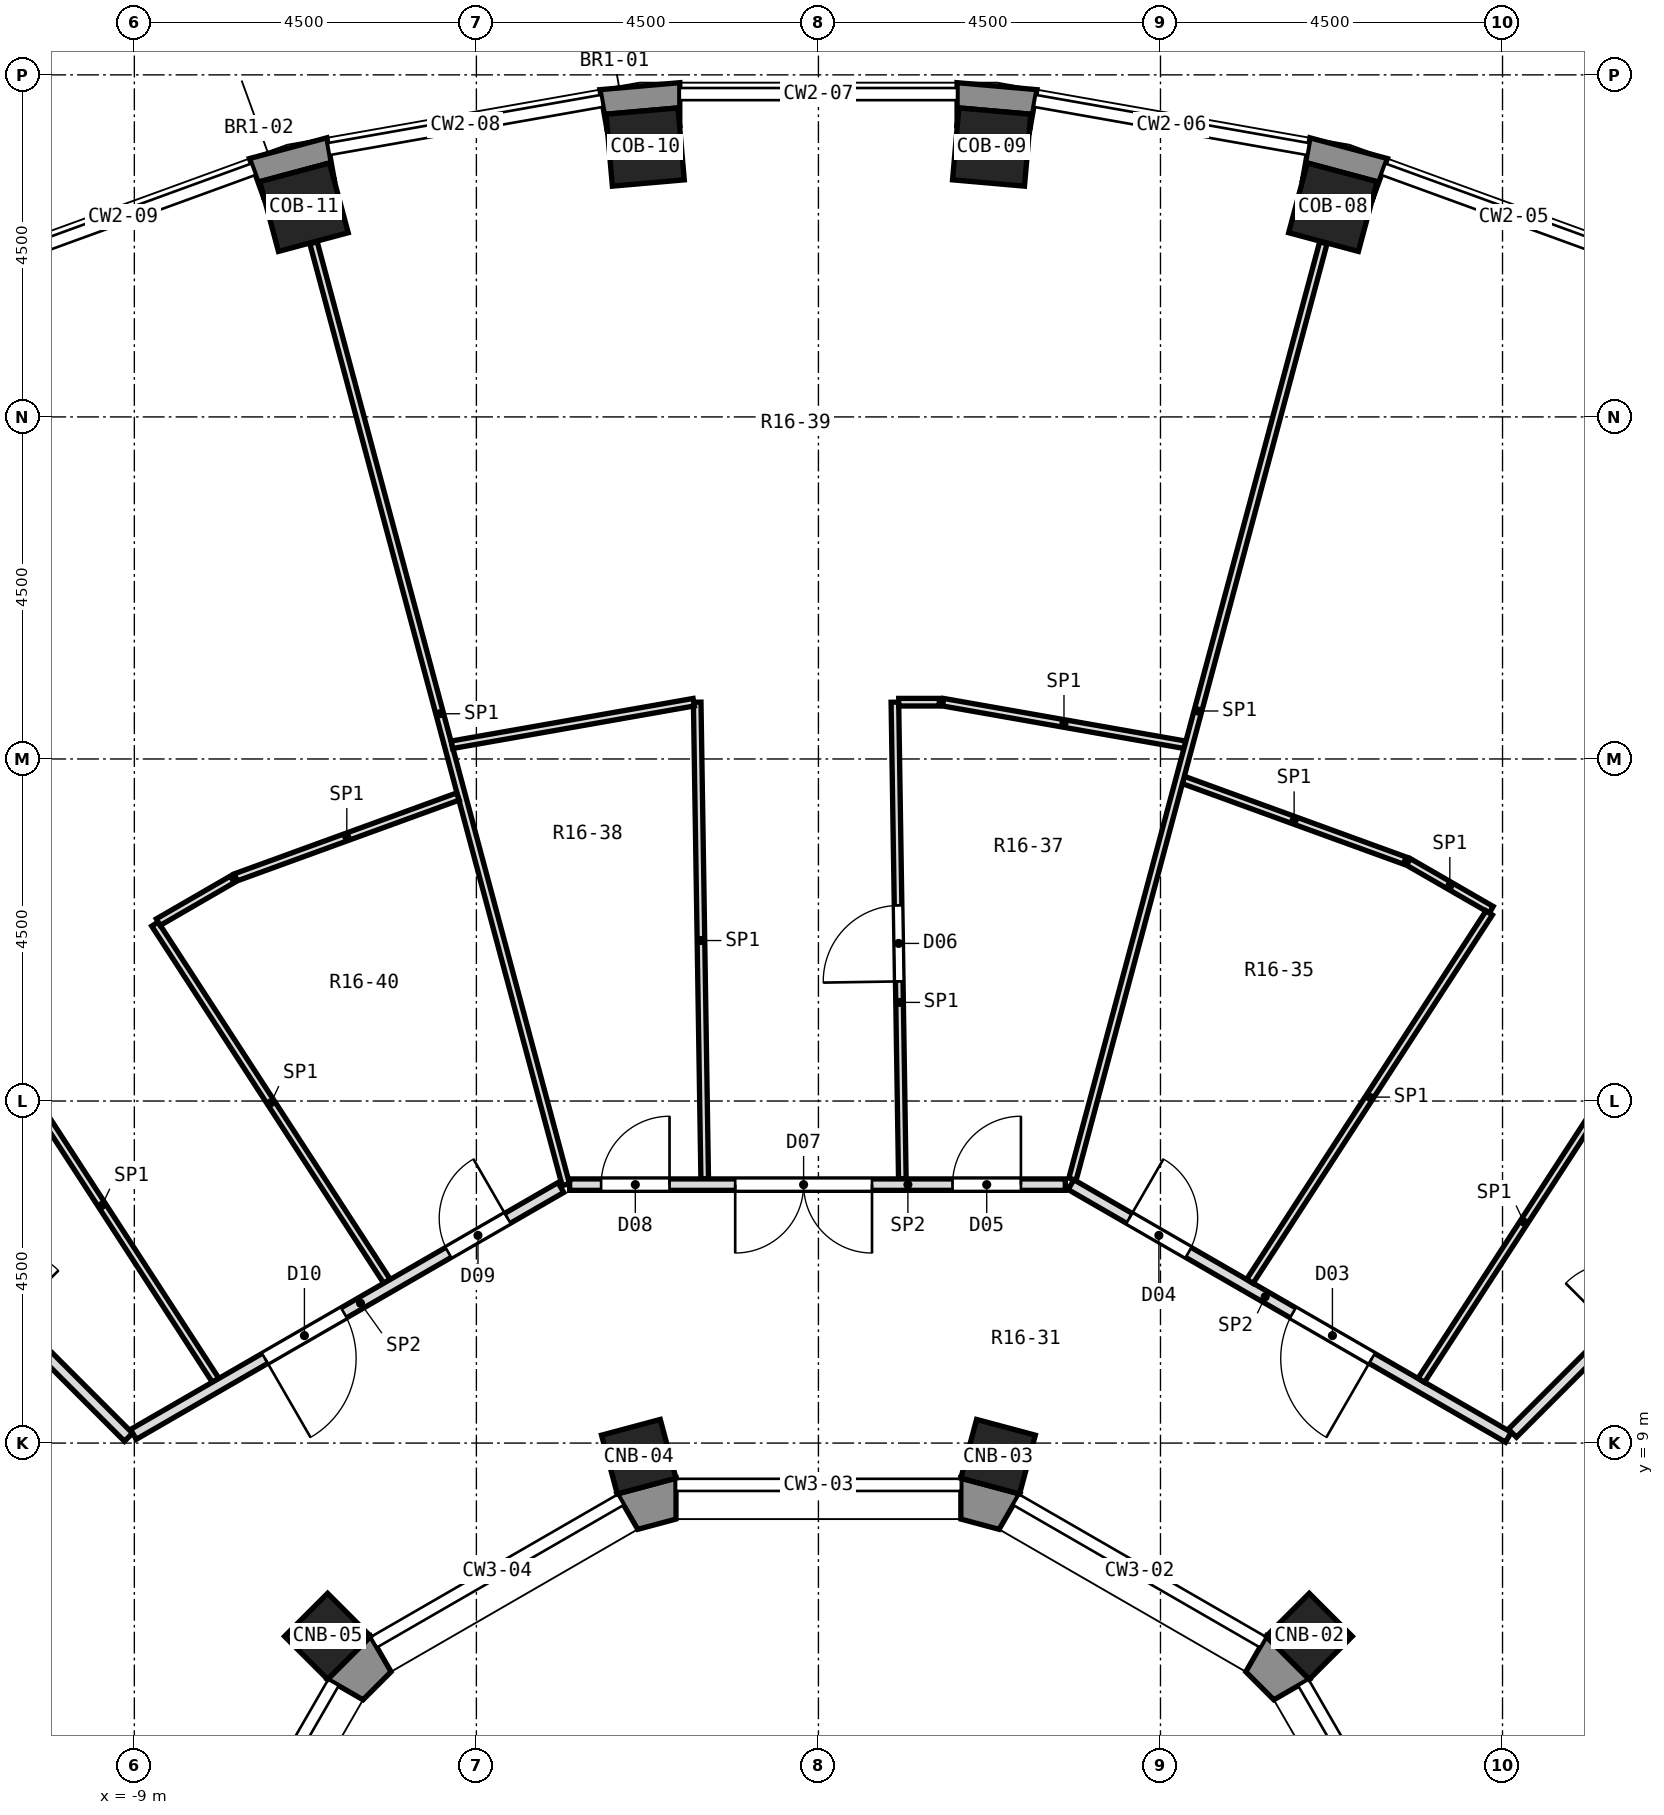
"""IFC4 building model, lengths in metres.
Left out: names, types, materials, properties, quantities, classifications, styles, units other than length and angle.
Written with IfcOpenShell. Run it as: python <this file> out.ifc"""

import sys

from ifc_helpers import new_model, si_unit, direction, frame, frame_2d, origin, origin_2d, place, context, subcontext, project, spatial, polyline, rectangle, outline, extrude, element, fill, save


model = new_model("IFC4")
c1 = context("Model", 3, precision=1e-05, world=origin(), true_north=direction((0.0, 1.0)))
c2 = subcontext(c1, "Body", "Model", "MODEL_VIEW")
j1 = project(units=[si_unit("LENGTHUNIT", "METRE"), si_unit("PLANEANGLEUNIT", "RADIAN")], contexts=[c1])
p1 = place(None, origin())
s1 = spatial("IfcSite", under=j1, at=p1, CompositionType="ELEMENT")
p2 = place(p1, origin())
s2 = spatial("IfcBuilding", under=s1, at=p2, CompositionType="ELEMENT")
p3 = place(p2, frame((0.0, 0.0, 86.9)))
s3 = spatial("IfcBuildingStorey", under=s2, at=p3, CompositionType="ELEMENT", Elevation=86.9)
for number, where, z_axis, x_axis in (
    (1, (6.768, 25.259, -0.55), (0.0, 0.0, 1.0), (0.259, 0.966, 0.0)),
    (2, (2.279, 26.051, -0.55), (0.0, 0.0, 1.0), (0.087, 0.996, 0.0)),
    (3, (-2.279, 26.051, -0.55), (0.0, 0.0, 1.0), (-0.087, 0.996, 0.0)),
    (4, (-6.768, 25.259, -0.55), (0.0, 0.0, 1.0), (-0.259, 0.966, 0.0)),
):
    element("IfcColumn", number, at=place(p3, frame(where, z_axis=z_axis, x_axis=x_axis)), inside=s3, PredefinedType="COLUMN", context=c2, shape_type="SweptSolid", body=[
        extrude(rectangle(XDim=0.95, YDim=0.95, at=origin_2d()), origin(), (0.0, 0.0, 1.0), 5.55),
    ])
for number, where, z_axis, x_axis in (
    (5, (6.458, 6.458, 0.0), (0.0, 0.0, 1.0), (0.707, 0.707, 0.0)),
    (6, (2.364, 8.821, 0.0), (0.0, 0.0, 1.0), (0.259, 0.966, 0.0)),
    (7, (-2.364, 8.821, 0.0), (0.0, 0.0, 1.0), (-0.259, 0.966, 0.0)),
    (8, (-6.458, 6.458, 0.0), (0.0, 0.0, 1.0), (-0.707, 0.707, 0.0)),
):
    element("IfcColumn", number, at=place(p3, frame(where, z_axis=z_axis, x_axis=x_axis)), inside=s3, PredefinedType="COLUMN", context=c2, shape_type="SweptSolid", body=[
        extrude(rectangle(XDim=0.8, YDim=0.8, at=origin_2d()), origin(), (0.0, 0.0, 1.0), 5.0),
    ])
p4 = place(p3, origin())
e9 = element("IfcWall", 9, at=p4, inside=s3, PredefinedType="SOLIDWALL", context=c2, shape_type="SweptSolid", body=[
    extrude(outline(polyline([(7.486, 25.899), (6.467, 26.172), (6.363, 25.581), (6.432, 25.841), (7.35, 25.595), (7.28, 25.335), (7.486, 25.899)])), origin(), (0.0, 0.0, 1.0), 4.5),
])
p5 = place(p3, origin())
e10 = element("IfcWall", 10, at=p5, inside=s3, PredefinedType="SOLIDWALL", context=c2, shape_type="SweptSolid", body=[
    extrude(outline(polyline([(2.875, 26.805), (1.824, 26.897), (1.824, 26.297), (1.847, 26.565), (2.794, 26.482), (2.77, 26.215), (2.875, 26.805)])), origin(), (0.0, 0.0, 1.0), 4.5),
])
p6 = place(p3, origin())
e11 = element("IfcWall", 11, at=p6, inside=s3, PredefinedType="SOLIDWALL", context=c2, shape_type="SweptSolid", body=[
    extrude(outline(polyline([(-2.875, 26.805), (-2.77, 26.215), (-2.794, 26.482), (-1.847, 26.565), (-1.824, 26.297), (-1.824, 26.897), (-2.875, 26.805)])), origin(), (0.0, 0.0, 1.0), 4.5),
])
p7 = place(p3, origin())
e12 = element("IfcWall", 12, at=p7, inside=s3, PredefinedType="SOLIDWALL", context=c2, shape_type="SweptSolid", body=[
    extrude(outline(polyline([(-6.467, 26.172), (-7.486, 25.899), (-7.28, 25.335), (-7.35, 25.595), (-6.432, 25.841), (-6.363, 25.581), (-6.467, 26.172)])), origin(), (0.0, 0.0, 1.0), 4.5),
])
p8 = place(p3, origin())
e13 = element("IfcWall", 13, at=p8, inside=s3, PredefinedType="SOLIDWALL", context=c2, shape_type="SweptSolid", body=[
    extrude(outline(polyline([(5.892, 6.458), (5.623, 5.991), (5.991, 5.623), (6.458, 5.892), (5.892, 6.458)])), origin(), (0.0, 0.0, 1.0), 4.5),
])
p9 = place(p3, origin())
e14 = element("IfcWall", 14, at=p9, inside=s3, PredefinedType="SOLIDWALL", context=c2, shape_type="SweptSolid", body=[
    extrude(outline(polyline([(1.874, 8.538), (1.874, 8.0), (2.377, 7.865), (2.646, 8.331), (1.874, 8.538)])), origin(), (0.0, 0.0, 1.0), 4.5),
])
p10 = place(p3, origin())
e15 = element("IfcWall", 15, at=p10, inside=s3, PredefinedType="SOLIDWALL", context=c2, shape_type="SweptSolid", body=[
    extrude(outline(polyline([(-2.646, 8.331), (-2.377, 7.865), (-1.874, 8.0), (-1.874, 8.538), (-2.646, 8.331)])), origin(), (0.0, 0.0, 1.0), 4.5),
])
p11 = place(p3, origin())
e16 = element("IfcWall", 16, at=p11, inside=s3, PredefinedType="SOLIDWALL", context=c2, shape_type="SweptSolid", body=[
    extrude(outline(polyline([(-6.458, 5.892), (-5.991, 5.623), (-5.623, 5.991), (-5.892, 6.458), (-6.458, 5.892)])), origin(), (0.0, 0.0, 1.0), 4.5),
])
p12 = place(p3, frame((-1.595, 18.747, 0.0), z_axis=(0.0, 0.0, 1.0), x_axis=(0.015762930389, -0.999875757295, 0.0)))
e17 = element("IfcWall", 17, at=p12, inside=s3, PredefinedType="PARTITIONING", context=c2, shape_type="SweptSolid", body=[
    extrude(rectangle(XDim=6.273, YDim=0.1, at=frame_2d((3.136, 0.0))), origin(), (0.0, 0.0, 1.0), 4.5),
])
p13 = place(p3, frame((1.006, 18.747, 0.0), z_axis=(0.0, 0.0, 1.0), x_axis=(0.015568373772, -0.999878805525, 0.0)))
e18 = element("IfcWall", 18, at=p13, inside=s3, PredefinedType="PARTITIONING", context=c2, shape_type="SweptSolid", body=[
    extrude(rectangle(XDim=6.273, YDim=0.1, at=frame_2d((3.136, 0.0))), origin(), (0.0, 0.0, 1.0), 4.5),
])
p14 = place(p13, frame((2.674, 0.0, 0.0)))
e19 = element("IfcOpeningElement", 19, at=p14, cuts=e18, PredefinedType="OPENING", context=c2, shape_type="SweptSolid", body=[
    extrude(rectangle(XDim=1.0, YDim=2.1, at=frame_2d((0.5, 1.05))), frame((0.0, 0.062, 0.0), z_axis=(0.0, -1.0, 0.0), x_axis=(1.0, 0.0, 0.0)), (0.0, 0.0, 1.0), 0.124),
])
p15 = place(p3, frame((-6.643, 24.791, 0.0), z_axis=(0.0, 0.0, 1.0), x_axis=(0.258784286108, -0.965935139263, 0.0)))
e20 = element("IfcWall", 20, at=p15, inside=s3, PredefinedType="PARTITIONING", context=c2, shape_type="SweptSolid", body=[
    extrude(rectangle(XDim=12.828, YDim=0.1, at=frame_2d((6.414, 0.0))), origin(), (0.0, 0.0, 1.0), 4.5),
])
p16 = place(p3, frame((-10.92, 14.429, 0.0), z_axis=(0.0, 0.0, 1.0), x_axis=(0.54460991282, -0.838689479401, 0.0)))
e21 = element("IfcWall", 21, at=p16, inside=s3, PredefinedType="PARTITIONING", context=c2, shape_type="SweptSolid", body=[
    extrude(rectangle(XDim=5.488, YDim=0.1, at=frame_2d((2.744, 0.0))), origin(), (0.0, 0.0, 1.0), 4.5),
])
p17 = place(p3, frame((-8.729, 15.828, 0.0), z_axis=(0.0, 0.0, 1.0), x_axis=(0.544769380459, -0.838585906222, 0.0)))
e22 = element("IfcWall", 22, at=p17, inside=s3, PredefinedType="PARTITIONING", context=c2, shape_type="SweptSolid", body=[
    extrude(rectangle(XDim=5.605, YDim=0.1, at=frame_2d((2.802, 0.0))), origin(), (0.0, 0.0, 1.0), 4.5),
])
p18 = place(p3, frame((-13.065, 13.065, 0.0), z_axis=(0.0, 0.0, 1.0), x_axis=(0.707106781187, -0.707106781187, 0.0)))
e23 = element("IfcWall", 23, at=p18, inside=s3, PredefinedType="PARTITIONING", context=c2, shape_type="SweptSolid", body=[
    extrude(rectangle(XDim=5.64, YDim=0.15, at=frame_2d((2.82, 0.0))), origin(), (0.0, 0.0, 1.0), 4.5),
])
p19 = place(p18, frame((2.537, 0.0, 0.0)))
e24 = element("IfcOpeningElement", 24, at=p19, cuts=e23, PredefinedType="OPENING", context=c2, shape_type="SweptSolid", body=[
    extrude(rectangle(XDim=0.9, YDim=2.1, at=frame_2d((0.45, 1.05))), frame((0.0, 0.087, 0.0), z_axis=(0.0, -1.0, 0.0), x_axis=(1.0, 0.0, 0.0)), (0.0, 0.0, 1.0), 0.174),
])
p20 = place(p3, frame((3.323, 12.4, 0.0), z_axis=(0.0, 0.0, 1.0), x_axis=(0.865961614908, -0.500110469302, 0.0)))
e25 = element("IfcWall", 25, at=p20, inside=s3, PredefinedType="PARTITIONING", context=c2, shape_type="SweptSolid", body=[
    extrude(rectangle(XDim=6.645, YDim=0.15, at=frame_2d((3.322, 0.0))), origin(), (0.0, 0.0, 1.0), 4.5),
])
p21 = place(p20, frame((3.372, 0.0, 0.0)))
e26 = element("IfcOpeningElement", 26, at=p21, cuts=e25, PredefinedType="OPENING", context=c2, shape_type="SweptSolid", body=[
    extrude(rectangle(XDim=1.2, YDim=2.1, at=frame_2d((0.6, 1.05))), frame((0.0, 0.087, 0.0), z_axis=(0.0, -1.0, 0.0), x_axis=(1.0, 0.0, 0.0)), (0.0, 0.0, 1.0), 0.174),
])
p22 = place(p20, frame((0.885, 0.0, 0.0)))
e27 = element("IfcOpeningElement", 27, at=p22, cuts=e25, PredefinedType="OPENING", context=c2, shape_type="SweptSolid", body=[
    extrude(rectangle(XDim=0.9, YDim=2.1, at=frame_2d((0.45, 1.05))), frame((0.0, 0.087, 0.0), z_axis=(0.0, -1.0, 0.0), x_axis=(1.0, 0.0, 0.0)), (0.0, 0.0, 1.0), 0.174),
])
p23 = place(p3, frame((7.762, 16.646, 0.0), z_axis=(0.0, 0.0, 1.0), x_axis=(0.866182356389, -0.499728051525, 0.0)))
e28 = element("IfcWall", 28, at=p23, inside=s3, PredefinedType="PARTITIONING", context=c2, shape_type="SweptSolid", body=[
    extrude(rectangle(XDim=1.259, YDim=0.1, at=frame_2d((0.629, 0.0))), origin(), (0.0, 0.0, 1.0), 4.5),
])
p24 = place(p3, frame((4.801, 17.724, 0.0), z_axis=(0.0, 0.0, 1.0), x_axis=(0.939676140835, -0.342065418225, 0.0)))
e29 = element("IfcWall", 29, at=p24, inside=s3, PredefinedType="PARTITIONING", context=c2, shape_type="SweptSolid", body=[
    extrude(rectangle(XDim=3.101, YDim=0.1, at=frame_2d((1.551, 0.0))), origin(), (0.0, 0.0, 1.0), 4.5),
])
p25 = place(p3, frame((1.64, 18.747, 0.0), z_axis=(0.0, 0.0, 1.0), x_axis=(0.984847393416, -0.173423215521, 0.0)))
e30 = element("IfcWall", 30, at=p25, inside=s3, PredefinedType="PARTITIONING", context=c2, shape_type="SweptSolid", body=[
    extrude(rectangle(XDim=3.231, YDim=0.1, at=frame_2d((1.615, 0.0))), origin(), (0.0, 0.0, 1.0), 4.5),
])
p26 = place(p3, frame((-3.273, 12.4, 0.0), z_axis=(0.0, 0.0, 1.0), x_axis=(1.0, 0.0, 0.0)))
e31 = element("IfcWall", 31, at=p26, inside=s3, PredefinedType="PARTITIONING", context=c2, shape_type="SweptSolid", body=[
    extrude(rectangle(XDim=6.521, YDim=0.15, at=frame_2d((3.26, 0.0))), origin(), (0.0, 0.0, 1.0), 4.5),
])
p27 = place(p26, frame((5.037, 0.0, 0.0)))
e32 = element("IfcOpeningElement", 32, at=p27, cuts=e31, PredefinedType="OPENING", context=c2, shape_type="SweptSolid", body=[
    extrude(rectangle(XDim=0.9, YDim=2.1, at=frame_2d((0.45, 1.05))), frame((0.0, 0.087, 0.0), z_axis=(0.0, -1.0, 0.0), x_axis=(1.0, 0.0, 0.0)), (0.0, 0.0, 1.0), 0.174),
])
p28 = place(p26, frame((2.178, 0.0, 0.0)))
e33 = element("IfcOpeningElement", 33, at=p28, cuts=e31, PredefinedType="OPENING", context=c2, shape_type="SweptSolid", body=[
    extrude(rectangle(XDim=1.8, YDim=2.1, at=frame_2d((0.9, 1.05))), frame((0.0, 0.087, 0.0), z_axis=(0.0, -1.0, 0.0), x_axis=(1.0, 0.0, 0.0)), (0.0, 0.0, 1.0), 0.174),
])
p29 = place(p26, frame((0.414, 0.0, 0.0)))
e34 = element("IfcOpeningElement", 34, at=p29, cuts=e31, PredefinedType="OPENING", context=c2, shape_type="SweptSolid", body=[
    extrude(rectangle(XDim=0.9, YDim=2.1, at=frame_2d((0.45, 1.05))), frame((0.0, 0.087, 0.0), z_axis=(0.0, -1.0, 0.0), x_axis=(1.0, 0.0, 0.0)), (0.0, 0.0, 1.0), 0.174),
])
p30 = place(p3, frame((1.056, 18.747, 0.0), z_axis=(0.0, 0.0, 1.0), x_axis=(1.0, 0.0, 0.0)))
e35 = element("IfcWall", 35, at=p30, inside=s3, PredefinedType="PARTITIONING", context=c2, shape_type="SweptSolid", body=[
    extrude(rectangle(XDim=0.534, YDim=0.1, at=frame_2d((0.267, 0.0))), origin(), (0.0, 0.0, 1.0), 4.5),
])
p31 = place(p3, frame((-4.822, 18.187, 0.0), z_axis=(0.0, 0.0, 1.0), x_axis=(0.984847393416, 0.173423215521, 0.0)))
e36 = element("IfcWall", 36, at=p31, inside=s3, PredefinedType="PARTITIONING", context=c2, shape_type="SweptSolid", body=[
    extrude(rectangle(XDim=3.231, YDim=0.1, at=frame_2d((1.615, 0.0))), origin(), (0.0, 0.0, 1.0), 4.5),
])
p32 = place(p3, frame((-7.667, 16.442, 0.0), z_axis=(0.0, 0.0, 1.0), x_axis=(0.93972467972, 0.34193204928, 0.0)))
e37 = element("IfcWall", 37, at=p32, inside=s3, PredefinedType="PARTITIONING", context=c2, shape_type="SweptSolid", body=[
    extrude(rectangle(XDim=3.112, YDim=0.1, at=frame_2d((1.556, 0.0))), origin(), (0.0, 0.0, 1.0), 4.5),
])
p33 = place(p3, frame((-9.012, 9.115, 0.0), z_axis=(0.0, 0.0, 1.0), x_axis=(0.865967095912, 0.5001009786, 0.0)))
e38 = element("IfcWall", 38, at=p33, inside=s3, PredefinedType="PARTITIONING", context=c2, shape_type="SweptSolid", body=[
    extrude(rectangle(XDim=6.495, YDim=0.15, at=frame_2d((3.248, 0.0))), origin(), (0.0, 0.0, 1.0), 4.5),
])
p34 = place(p33, frame((4.785, 0.0, 0.0)))
e39 = element("IfcOpeningElement", 39, at=p34, cuts=e38, PredefinedType="OPENING", context=c2, shape_type="SweptSolid", body=[
    extrude(rectangle(XDim=0.9, YDim=2.1, at=frame_2d((0.45, 1.05))), frame((0.0, 0.087, 0.0), z_axis=(0.0, -1.0, 0.0), x_axis=(1.0, 0.0, 0.0)), (0.0, 0.0, 1.0), 0.174),
])
p35 = place(p33, frame((1.998, 0.0, 0.0)))
e40 = element("IfcOpeningElement", 40, at=p35, cuts=e38, PredefinedType="OPENING", context=c2, shape_type="SweptSolid", body=[
    extrude(rectangle(XDim=1.2, YDim=2.1, at=frame_2d((0.6, 1.05))), frame((0.0, 0.087, 0.0), z_axis=(0.0, -1.0, 0.0), x_axis=(1.0, 0.0, 0.0)), (0.0, 0.0, 1.0), 0.174),
])
p36 = place(p3, frame((-8.686, 15.853, 0.0), z_axis=(0.0, 0.0, 1.0), x_axis=(0.865752432539, 0.500472502294, 0.0)))
e41 = element("IfcWall", 41, at=p36, inside=s3, PredefinedType="PARTITIONING", context=c2, shape_type="SweptSolid", body=[
    extrude(rectangle(XDim=1.127, YDim=0.1, at=frame_2d((0.563, 0.0))), origin(), (0.0, 0.0, 1.0), 4.5),
])
p37 = place(p3, frame((9.13, 9.13, 0.0), z_axis=(0.0, 0.0, 1.0), x_axis=(0.707106781187, 0.707106781187, 0.0)))
e42 = element("IfcWall", 42, at=p37, inside=s3, PredefinedType="PARTITIONING", context=c2, shape_type="SweptSolid", body=[
    extrude(rectangle(XDim=5.545, YDim=0.15, at=frame_2d((2.772, 0.0))), origin(), (0.0, 0.0, 1.0), 4.5),
])
p38 = place(p37, frame((1.89, 0.0, 0.0)))
e43 = element("IfcOpeningElement", 43, at=p38, cuts=e42, PredefinedType="OPENING", context=c2, shape_type="SweptSolid", body=[
    extrude(rectangle(XDim=0.9, YDim=2.1, at=frame_2d((0.45, 1.05))), frame((0.0, 0.087, 0.0), z_axis=(0.0, -1.0, 0.0), x_axis=(1.0, 0.0, 0.0)), (0.0, 0.0, 1.0), 0.174),
])
p39 = place(p3, frame((7.931, 9.826, 0.0), z_axis=(0.0, 0.0, 1.0), x_axis=(0.544635552354, 0.838672829602, 0.0)))
e44 = element("IfcWall", 44, at=p39, inside=s3, PredefinedType="PARTITIONING", context=c2, shape_type="SweptSolid", body=[
    extrude(rectangle(XDim=4.963, YDim=0.1, at=frame_2d((2.481, 0.0))), origin(), (0.0, 0.0, 1.0), 4.5),
])
p40 = place(p3, frame((5.676, 11.128, 0.0), z_axis=(0.0, 0.0, 1.0), x_axis=(0.544777517704, 0.838580619979, 0.0)))
e45 = element("IfcWall", 45, at=p40, inside=s3, PredefinedType="PARTITIONING", context=c2, shape_type="SweptSolid", body=[
    extrude(rectangle(XDim=5.78, YDim=0.1, at=frame_2d((2.89, 0.0))), origin(), (0.0, 0.0, 1.0), 4.5),
])
p41 = place(p3, frame((3.342, 12.472, 0.0), z_axis=(0.0, 0.0, 1.0), x_axis=(0.258799243674, 0.965931131848, 0.0)))
e46 = element("IfcWall", 46, at=p41, inside=s3, PredefinedType="PARTITIONING", context=c2, shape_type="SweptSolid", body=[
    extrude(rectangle(XDim=12.752, YDim=0.1, at=frame_2d((6.376, 0.0))), origin(), (0.0, 0.0, 1.0), 4.5),
])
p42 = place(p21, frame((1.2, 0.0, 0.0), z_axis=(0.0, 0.0, 1.0), x_axis=(-1.0, 0.0, 0.0)))
e47 = element("IfcDoor", 47, at=p42, inside=s3, OperationType="SINGLE_SWING_LEFT", PredefinedType="DOOR", context=c2, shape_type="SweptSolid", body=[
    extrude(rectangle(XDim=1.2, YDim=2.1, at=frame_2d((0.6, 1.05))), frame((0.0, 0.025, 0.0), z_axis=(0.0, -1.0, 0.0), x_axis=(1.0, 0.0, 0.0)), (0.0, 0.0, 1.0), 0.05),
])
fill(e26, e47)
p43 = place(p22, origin())
e48 = element("IfcDoor", 48, at=p43, inside=s3, OperationType="SINGLE_SWING_LEFT", PredefinedType="DOOR", context=c2, shape_type="SweptSolid", body=[
    extrude(rectangle(XDim=0.9, YDim=2.1, at=frame_2d((0.45, 1.05))), frame((0.0, 0.025, 0.0), z_axis=(0.0, -1.0, 0.0), x_axis=(1.0, 0.0, 0.0)), (0.0, 0.0, 1.0), 0.05),
])
fill(e27, e48)
p44 = place(p27, origin())
e49 = element("IfcDoor", 49, at=p44, inside=s3, OperationType="SINGLE_SWING_RIGHT", PredefinedType="DOOR", context=c2, shape_type="SweptSolid", body=[
    extrude(rectangle(XDim=0.9, YDim=2.1, at=frame_2d((0.45, 1.05))), frame((0.0, 0.025, 0.0), z_axis=(0.0, -1.0, 0.0), x_axis=(1.0, 0.0, 0.0)), (0.0, 0.0, 1.0), 0.05),
])
fill(e32, e49)
p45 = place(p14, frame((1.0, 0.0, 0.0), z_axis=(0.0, 0.0, 1.0), x_axis=(-1.0, 0.0, 0.0)))
e50 = element("IfcDoor", 50, at=p45, inside=s3, OperationType="SINGLE_SWING_LEFT", PredefinedType="DOOR", context=c2, shape_type="SweptSolid", body=[
    extrude(rectangle(XDim=1.0, YDim=2.1, at=frame_2d((0.5, 1.05))), frame((0.0, 0.025, 0.0), z_axis=(0.0, -1.0, 0.0), x_axis=(1.0, 0.0, 0.0)), (0.0, 0.0, 1.0), 0.05),
])
fill(e19, e50)
p46 = place(p28, frame((1.8, 0.0, 0.0), z_axis=(0.0, 0.0, 1.0), x_axis=(-1.0, 0.0, 0.0)))
e51 = element("IfcDoor", 51, at=p46, inside=s3, OperationType="DOUBLE_DOOR_SINGLE_SWING", PredefinedType="DOOR", context=c2, shape_type="SweptSolid", body=[
    extrude(rectangle(XDim=1.8, YDim=2.1, at=frame_2d((0.9, 1.05))), frame((0.0, 0.025, 0.0), z_axis=(0.0, -1.0, 0.0), x_axis=(1.0, 0.0, 0.0)), (0.0, 0.0, 1.0), 0.05),
])
fill(e33, e51)
p47 = place(p29, origin())
e52 = element("IfcDoor", 52, at=p47, inside=s3, OperationType="SINGLE_SWING_RIGHT", PredefinedType="DOOR", context=c2, shape_type="SweptSolid", body=[
    extrude(rectangle(XDim=0.9, YDim=2.1, at=frame_2d((0.45, 1.05))), frame((0.0, 0.025, 0.0), z_axis=(0.0, -1.0, 0.0), x_axis=(1.0, 0.0, 0.0)), (0.0, 0.0, 1.0), 0.05),
])
fill(e34, e52)
p48 = place(p34, origin())
e53 = element("IfcDoor", 53, at=p48, inside=s3, OperationType="SINGLE_SWING_RIGHT", PredefinedType="DOOR", context=c2, shape_type="SweptSolid", body=[
    extrude(rectangle(XDim=0.9, YDim=2.1, at=frame_2d((0.45, 1.05))), frame((0.0, 0.025, 0.0), z_axis=(0.0, -1.0, 0.0), x_axis=(1.0, 0.0, 0.0)), (0.0, 0.0, 1.0), 0.05),
])
fill(e39, e53)
p49 = place(p35, frame((1.2, 0.0, 0.0), z_axis=(0.0, 0.0, 1.0), x_axis=(-1.0, 0.0, 0.0)))
e54 = element("IfcDoor", 54, at=p49, inside=s3, OperationType="SINGLE_SWING_RIGHT", PredefinedType="DOOR", context=c2, shape_type="SweptSolid", body=[
    extrude(rectangle(XDim=1.2, YDim=2.1, at=frame_2d((0.6, 1.05))), frame((0.0, 0.025, 0.0), z_axis=(0.0, -1.0, 0.0), x_axis=(1.0, 0.0, 0.0)), (0.0, 0.0, 1.0), 0.05),
])
fill(e40, e54)
save(model, sys.argv[1])
